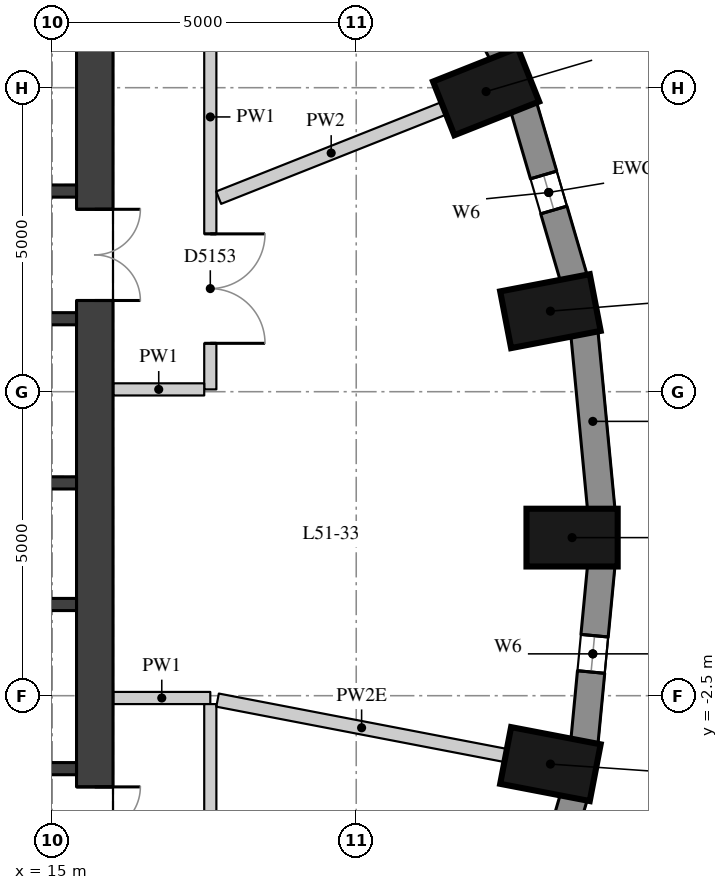
"""IFC4 building model, lengths in metres.
Left out: names, types, materials, properties, quantities, classifications, styles, units other than length and angle.
Written with IfcOpenShell. Run it as: python <this file> out.ifc"""

import sys

from ifc_helpers import new_model, si_unit, direction, frame, frame_2d, origin, origin_2d, place, context, subcontext, project, spatial, rectangle, extrude, element, fill, save


model = new_model("IFC4")
c1 = context("Model", 3, precision=1e-05, world=origin(), true_north=direction((0.0, 1.0)))
c2 = subcontext(c1, "Body", "Model", "MODEL_VIEW")
j1 = project(units=[si_unit("LENGTHUNIT", "METRE"), si_unit("PLANEANGLEUNIT", "RADIAN")], contexts=[c1])
p1 = place(None, origin())
s1 = spatial("IfcSite", under=j1, at=p1, CompositionType="ELEMENT")
p2 = place(p1, origin())
s2 = spatial("IfcBuilding", under=s1, at=p2, CompositionType="ELEMENT")
p3 = place(p2, frame((0.0, 0.0, 181.4)))
s3 = spatial("IfcBuildingStorey", under=s2, at=p3, CompositionType="ELEMENT", Elevation=181.4)
for number, where, z_axis, x_axis in (
    (1, (23.55, 0.1, 0.0), (0.0, 0.0, 1.0), (1.0, 0.0, 0.0)),
    (2, (23.194, 3.825, 0.0), (0.0, 0.0, 1.0), (0.982, 0.189, 0.0)),
    (3, (22.136, 7.436, 0.0), (0.0, 0.0, 1.0), (0.93, 0.369, 0.0)),
    (4, (23.194, -3.625, 0.0), (0.0, 0.0, 1.0), (0.982, -0.189, 0.0)),
):
    element("IfcColumn", number, at=place(p3, frame(where, z_axis=z_axis, x_axis=x_axis)), inside=s3, PredefinedType="COLUMN", context=c2, shape_type="SweptSolid", body=[
        extrude(rectangle(XDim=1.5, YDim=0.95, at=origin_2d()), origin(), (0.0, 0.0, 1.0), 3.3),
    ])
p4 = place(p3, frame((24.031, 0.555, 0.0), z_axis=(0.0, 0.0, 1.0), x_axis=(-0.095265737322, 0.995451876935, 0.0)))
e5 = element("IfcWall", 5, at=p4, inside=s3, PredefinedType="SOLIDWALL", context=c2, shape_type="SweptSolid", body=[
    extrude(rectangle(XDim=2.927, YDim=0.45, at=frame_2d((1.463, 0.0))), origin(), (0.0, 0.0, 1.0), 2.85),
])
p5 = place(p3, frame((23.58, 4.362, 0.0), z_axis=(0.0, 0.0, 1.0), x_axis=(-0.281049481624, 0.959693278542, 0.0)))
e6 = element("IfcWall", 6, at=p5, inside=s3, PredefinedType="SOLIDWALL", context=c2, shape_type="SweptSolid", body=[
    extrude(rectangle(XDim=2.948, YDim=0.45, at=frame_2d((1.474, 0.0))), origin(), (0.0, 0.0, 1.0), 2.85),
])
p6 = place(p5, frame((1.174, 0.0, 0.4)))
e7 = element("IfcOpeningElement", 7, at=p6, cuts=e6, PredefinedType="OPENING", context=c2, shape_type="SweptSolid", body=[
    extrude(rectangle(XDim=0.6, YDim=1.75, at=frame_2d((0.3, 0.875))), frame((0.0, 0.235, 0.0), z_axis=(0.0, -1.0, 0.0), x_axis=(1.0, 0.0, 0.0)), (0.0, 0.0, 1.0), 0.47),
])
p7 = place(p3, frame((22.415, 8.037, 0.0), z_axis=(0.0, 0.0, 1.0), x_axis=(-0.454133999889, 0.890933392653, 0.0)))
e8 = element("IfcWall", 8, at=p7, inside=s3, PredefinedType="SOLIDWALL", context=c2, shape_type="SweptSolid", body=[
    extrude(rectangle(XDim=2.986, YDim=0.45, at=frame_2d((1.493, 0.0))), origin(), (0.0, 0.0, 1.0), 2.85),
])
p8 = place(p3, frame((22.751, -6.991, 0.0), z_axis=(0.0, 0.0, 1.0), x_axis=(0.281049481624, 0.959693278542, 0.0)))
e9 = element("IfcWall", 9, at=p8, inside=s3, PredefinedType="SOLIDWALL", context=c2, shape_type="SweptSolid", body=[
    extrude(rectangle(XDim=2.948, YDim=0.45, at=frame_2d((1.474, 0.0))), origin(), (0.0, 0.0, 1.0), 2.85),
])
p9 = place(p3, frame((23.752, -3.269, 0.0), z_axis=(0.0, 0.0, 1.0), x_axis=(0.095257827044, 0.995452633924, 0.0)))
e10 = element("IfcWall", 10, at=p9, inside=s3, PredefinedType="SOLIDWALL", context=c2, shape_type="SweptSolid", body=[
    extrude(rectangle(XDim=2.927, YDim=0.45, at=frame_2d((1.463, 0.0))), origin(), (0.0, 0.0, 1.0), 2.85),
])
p10 = place(p9, frame((1.163, 0.0, 0.4)))
e11 = element("IfcOpeningElement", 11, at=p10, cuts=e10, PredefinedType="OPENING", context=c2, shape_type="SweptSolid", body=[
    extrude(rectangle(XDim=0.6, YDim=1.75, at=frame_2d((0.3, 0.875))), frame((0.0, 0.235, 0.0), z_axis=(0.0, -1.0, 0.0), x_axis=(1.0, 0.0, 0.0)), (0.0, 0.0, 1.0), 0.47),
])
p11 = place(p3, frame((15.7, -9.4, 0.0), z_axis=(0.0, 0.0, 1.0), x_axis=(0.0, 1.0, 0.0)))
e12 = element("IfcWall", 12, at=p11, inside=s3, PredefinedType="SHEAR", context=c2, shape_type="SweptSolid", body=[
    extrude(rectangle(XDim=18.8, YDim=0.6, at=frame_2d((9.4, 0.0))), origin(), (0.0, 0.0, 1.0), 2.85),
])
p12 = place(p11, frame((13.4, 0.0, 0.0)))
e13 = element("IfcOpeningElement", 13, at=p12, cuts=e12, PredefinedType="OPENING", context=c2, shape_type="SweptSolid", body=[
    extrude(rectangle(XDim=1.5, YDim=2.1, at=frame_2d((0.75, 1.05))), frame((0.0, 0.31, 0.0), z_axis=(0.0, -1.0, 0.0), x_axis=(1.0, 0.0, 0.0)), (0.0, 0.0, 1.0), 0.62),
])
p13 = place(p11, frame((3.9, 0.0, 0.0)))
e14 = element("IfcOpeningElement", 14, at=p13, cuts=e12, PredefinedType="OPENING", context=c2, shape_type="SweptSolid", body=[
    extrude(rectangle(XDim=1.5, YDim=2.1, at=frame_2d((0.75, 1.05))), frame((0.0, 0.31, 0.0), z_axis=(0.0, -1.0, 0.0), x_axis=(1.0, 0.0, 0.0)), (0.0, 0.0, 1.0), 0.62),
])
p14 = place(p3, frame((4.6, 5.8, 0.0), z_axis=(0.0, 0.0, 1.0), x_axis=(1.0, 0.0, 0.0)))
e15 = element("IfcWall", 15, at=p14, inside=s3, PredefinedType="SHEAR", context=c2, shape_type="SweptSolid", body=[
    extrude(rectangle(XDim=10.8, YDim=0.2, at=frame_2d((5.4, 0.0))), origin(), (0.0, 0.0, 1.0), 2.85),
])
p15 = place(p14, frame((7.05, 0.0, 0.0)))
e16 = element("IfcOpeningElement", 16, at=p15, cuts=e15, PredefinedType="OPENING", context=c2, shape_type="SweptSolid", body=[
    extrude(rectangle(XDim=1.1, YDim=2.1, at=frame_2d((0.55, 1.05))), frame((0.0, 0.11, 0.0), z_axis=(0.0, -1.0, 0.0), x_axis=(1.0, 0.0, 0.0)), (0.0, 0.0, 1.0), 0.22),
])
p16 = place(p14, frame((9.05, 0.0, 0.0)))
e17 = element("IfcOpeningElement", 17, at=p16, cuts=e15, PredefinedType="OPENING", context=c2, shape_type="SweptSolid", body=[
    extrude(rectangle(XDim=1.1, YDim=2.1, at=frame_2d((0.55, 1.05))), frame((0.0, 0.11, 0.0), z_axis=(0.0, -1.0, 0.0), x_axis=(1.0, 0.0, 0.0)), (0.0, 0.0, 1.0), 0.22),
])
p17 = place(p3, frame((4.6, 3.7, 0.0), z_axis=(0.0, 0.0, 1.0), x_axis=(1.0, 0.0, 0.0)))
e18 = element("IfcWall", 18, at=p17, inside=s3, PredefinedType="SHEAR", context=c2, shape_type="SweptSolid", body=[
    extrude(rectangle(XDim=10.8, YDim=0.2, at=frame_2d((5.4, 0.0))), origin(), (0.0, 0.0, 1.0), 2.85),
])
p18 = place(p17, frame((6.6, 0.0, 0.0)))
e19 = element("IfcOpeningElement", 19, at=p18, cuts=e18, PredefinedType="OPENING", context=c2, shape_type="SweptSolid", body=[
    extrude(rectangle(XDim=1.1, YDim=2.1, at=frame_2d((0.55, 1.05))), frame((0.0, 0.11, 0.0), z_axis=(0.0, -1.0, 0.0), x_axis=(1.0, 0.0, 0.0)), (0.0, 0.0, 1.0), 0.22),
])
p19 = place(p17, frame((8.9, 0.0, 0.0)))
e20 = element("IfcOpeningElement", 20, at=p19, cuts=e18, PredefinedType="OPENING", context=c2, shape_type="SweptSolid", body=[
    extrude(rectangle(XDim=1.1, YDim=2.1, at=frame_2d((0.55, 1.05))), frame((0.0, 0.11, 0.0), z_axis=(0.0, -1.0, 0.0), x_axis=(1.0, 0.0, 0.0)), (0.0, 0.0, 1.0), 0.22),
])
for number, where, z_axis, x_axis in (
    (21, (4.6, 1.0, 0.0), (0.0, 0.0, 1.0), (1.0, 0.0, 0.0)),
    (22, (4.6, -1.0, 0.0), (0.0, 0.0, 1.0), (1.0, 0.0, 0.0)),
):
    element("IfcWall", number, at=place(p3, frame(where, z_axis=z_axis, x_axis=x_axis)), inside=s3, PredefinedType="SHEAR", context=c2, shape_type="SweptSolid", body=[
        extrude(rectangle(XDim=10.8, YDim=0.2, at=frame_2d((5.4, 0.0))), origin(), (0.0, 0.0, 1.0), 2.85),
    ])
p20 = place(p3, frame((4.6, -3.7, 0.0), z_axis=(0.0, 0.0, 1.0), x_axis=(1.0, 0.0, 0.0)))
e23 = element("IfcWall", 23, at=p20, inside=s3, PredefinedType="SHEAR", context=c2, shape_type="SweptSolid", body=[
    extrude(rectangle(XDim=10.8, YDim=0.2, at=frame_2d((5.4, 0.0))), origin(), (0.0, 0.0, 1.0), 2.85),
])
p21 = place(p20, frame((6.6, 0.0, 0.0)))
e24 = element("IfcOpeningElement", 24, at=p21, cuts=e23, PredefinedType="OPENING", context=c2, shape_type="SweptSolid", body=[
    extrude(rectangle(XDim=1.1, YDim=2.1, at=frame_2d((0.55, 1.05))), frame((0.0, 0.11, 0.0), z_axis=(0.0, -1.0, 0.0), x_axis=(1.0, 0.0, 0.0)), (0.0, 0.0, 1.0), 0.22),
])
p22 = place(p20, frame((8.9, 0.0, 0.0)))
e25 = element("IfcOpeningElement", 25, at=p22, cuts=e23, PredefinedType="OPENING", context=c2, shape_type="SweptSolid", body=[
    extrude(rectangle(XDim=1.1, YDim=2.1, at=frame_2d((0.55, 1.05))), frame((0.0, 0.11, 0.0), z_axis=(0.0, -1.0, 0.0), x_axis=(1.0, 0.0, 0.0)), (0.0, 0.0, 1.0), 0.22),
])
p23 = place(p3, frame((17.6, 11.5, 0.0), z_axis=(0.0, 0.0, 1.0), x_axis=(0.0, -1.0, 0.0)))
e26 = element("IfcWall", 26, at=p23, inside=s3, PredefinedType="PARTITIONING", context=c2, shape_type="SweptSolid", body=[
    extrude(rectangle(XDim=8.962, YDim=0.2, at=frame_2d((4.481, 0.0))), origin(), (0.0, 0.0, 1.0), 2.85),
])
p24 = place(p23, frame((6.404, 0.0, 0.0)))
e27 = element("IfcOpeningElement", 27, at=p24, cuts=e26, PredefinedType="OPENING", context=c2, shape_type="SweptSolid", body=[
    extrude(rectangle(XDim=1.8, YDim=2.1, at=frame_2d((0.9, 1.05))), frame((0.0, 0.11, 0.0), z_axis=(0.0, -1.0, 0.0), x_axis=(1.0, 0.0, 0.0)), (0.0, 0.0, 1.0), 0.22),
])
p25 = place(p3, frame((17.5, 2.538, 0.0), z_axis=(0.0, 0.0, 1.0), x_axis=(-1.0, 0.0, 0.0)))
e28 = element("IfcWall", 28, at=p25, inside=s3, PredefinedType="PARTITIONING", context=c2, shape_type="SweptSolid", body=[
    extrude(rectangle(XDim=1.496, YDim=0.2, at=frame_2d((0.748, 0.0))), origin(), (0.0, 0.0, 1.0), 2.85),
])
p26 = place(p3, frame((16.004, -2.538, 0.0), z_axis=(0.0, 0.0, 1.0), x_axis=(1.0, 0.0, 0.0)))
e29 = element("IfcWall", 29, at=p26, inside=s3, PredefinedType="PARTITIONING", context=c2, shape_type="SweptSolid", body=[
    extrude(rectangle(XDim=1.596, YDim=0.2, at=frame_2d((0.798, 0.0))), origin(), (0.0, 0.0, 1.0), 2.85),
])
p27 = place(p3, frame((17.6, -2.638, 0.0), z_axis=(0.0, 0.0, 1.0), x_axis=(0.0, -1.0, 0.0)))
e30 = element("IfcWall", 30, at=p27, inside=s3, PredefinedType="PARTITIONING", context=c2, shape_type="SweptSolid", body=[
    extrude(rectangle(XDim=8.962, YDim=0.2, at=frame_2d((4.481, 0.0))), origin(), (0.0, 0.0, 1.0), 2.85),
])
p28 = place(p27, frame((3.581, 0.0, 0.0)))
e31 = element("IfcOpeningElement", 31, at=p28, cuts=e30, PredefinedType="OPENING", context=c2, shape_type="SweptSolid", body=[
    extrude(rectangle(XDim=1.8, YDim=2.1, at=frame_2d((0.9, 1.05))), frame((0.0, 0.11, 0.0), z_axis=(0.0, -1.0, 0.0), x_axis=(1.0, 0.0, 0.0)), (0.0, 0.0, 1.0), 0.22),
])
p29 = place(p3, frame((21.439, 7.16, 0.0), z_axis=(0.0, 0.0, 1.0), x_axis=(-0.929517399972, -0.368778257426, 0.0)))
e32 = element("IfcWall", 32, at=p29, inside=s3, PredefinedType="PARTITIONING", context=c2, shape_type="SweptSolid", body=[
    extrude(rectangle(XDim=3.982, YDim=0.22, at=frame_2d((1.991, 0.0))), origin(), (0.0, 0.0, 1.0), 2.85),
])
p30 = place(p3, frame((22.457, -3.483, 0.0), z_axis=(0.0, 0.0, 1.0), x_axis=(-0.982022686577, 0.188762928159, 0.0)))
e33 = element("IfcWall", 33, at=p30, inside=s3, PredefinedType="PARTITIONING", context=c2, shape_type="SweptSolid", body=[
    extrude(rectangle(XDim=4.824, YDim=0.22, at=frame_2d((2.412, 0.0))), origin(), (0.0, 0.0, 1.0), 2.4),
])
p31 = place(p6, origin())
e34 = element("IfcWindow", 34, at=p31, inside=s3, PartitioningType="SINGLE_PANEL", PredefinedType="WINDOW", context=c2, shape_type="SweptSolid", body=[
    extrude(rectangle(XDim=0.6, YDim=1.75, at=frame_2d((0.3, 0.875))), frame((0.0, 0.035, 0.0), z_axis=(0.0, -1.0, 0.0), x_axis=(1.0, 0.0, 0.0)), (0.0, 0.0, 1.0), 0.06),
])
fill(e7, e34)
p32 = place(p10, origin())
e35 = element("IfcWindow", 35, at=p32, inside=s3, PartitioningType="SINGLE_PANEL", PredefinedType="WINDOW", context=c2, shape_type="SweptSolid", body=[
    extrude(rectangle(XDim=0.6, YDim=1.75, at=frame_2d((0.3, 0.875))), frame((0.0, 0.035, 0.0), z_axis=(0.0, -1.0, 0.0), x_axis=(1.0, 0.0, 0.0)), (0.0, 0.0, 1.0), 0.06),
])
fill(e11, e35)
p33 = place(p12, origin())
e36 = element("IfcDoor", 36, at=p33, inside=s3, OperationType="DOUBLE_DOOR_SINGLE_SWING", PredefinedType="DOOR", context=c2, shape_type="SweptSolid", body=[
    extrude(rectangle(XDim=1.5, YDim=2.1, at=frame_2d((0.75, 1.05))), frame((0.0, 0.025, 0.0), z_axis=(0.0, -1.0, 0.0), x_axis=(1.0, 0.0, 0.0)), (0.0, 0.0, 1.0), 0.05),
])
fill(e13, e36)
p34 = place(p13, origin())
e37 = element("IfcDoor", 37, at=p34, inside=s3, OperationType="DOUBLE_DOOR_SINGLE_SWING", PredefinedType="DOOR", context=c2, shape_type="SweptSolid", body=[
    extrude(rectangle(XDim=1.5, YDim=2.1, at=frame_2d((0.75, 1.05))), frame((0.0, 0.025, 0.0), z_axis=(0.0, -1.0, 0.0), x_axis=(1.0, 0.0, 0.0)), (0.0, 0.0, 1.0), 0.05),
])
fill(e14, e37)
p35 = place(p24, origin())
e38 = element("IfcDoor", 38, at=p35, inside=s3, OperationType="DOUBLE_DOOR_SINGLE_SWING", PredefinedType="DOOR", context=c2, shape_type="SweptSolid", body=[
    extrude(rectangle(XDim=1.8, YDim=2.1, at=frame_2d((0.9, 1.05))), frame((0.0, 0.025, 0.0), z_axis=(0.0, -1.0, 0.0), x_axis=(1.0, 0.0, 0.0)), (0.0, 0.0, 1.0), 0.05),
])
fill(e27, e38)
save(model, sys.argv[1])
